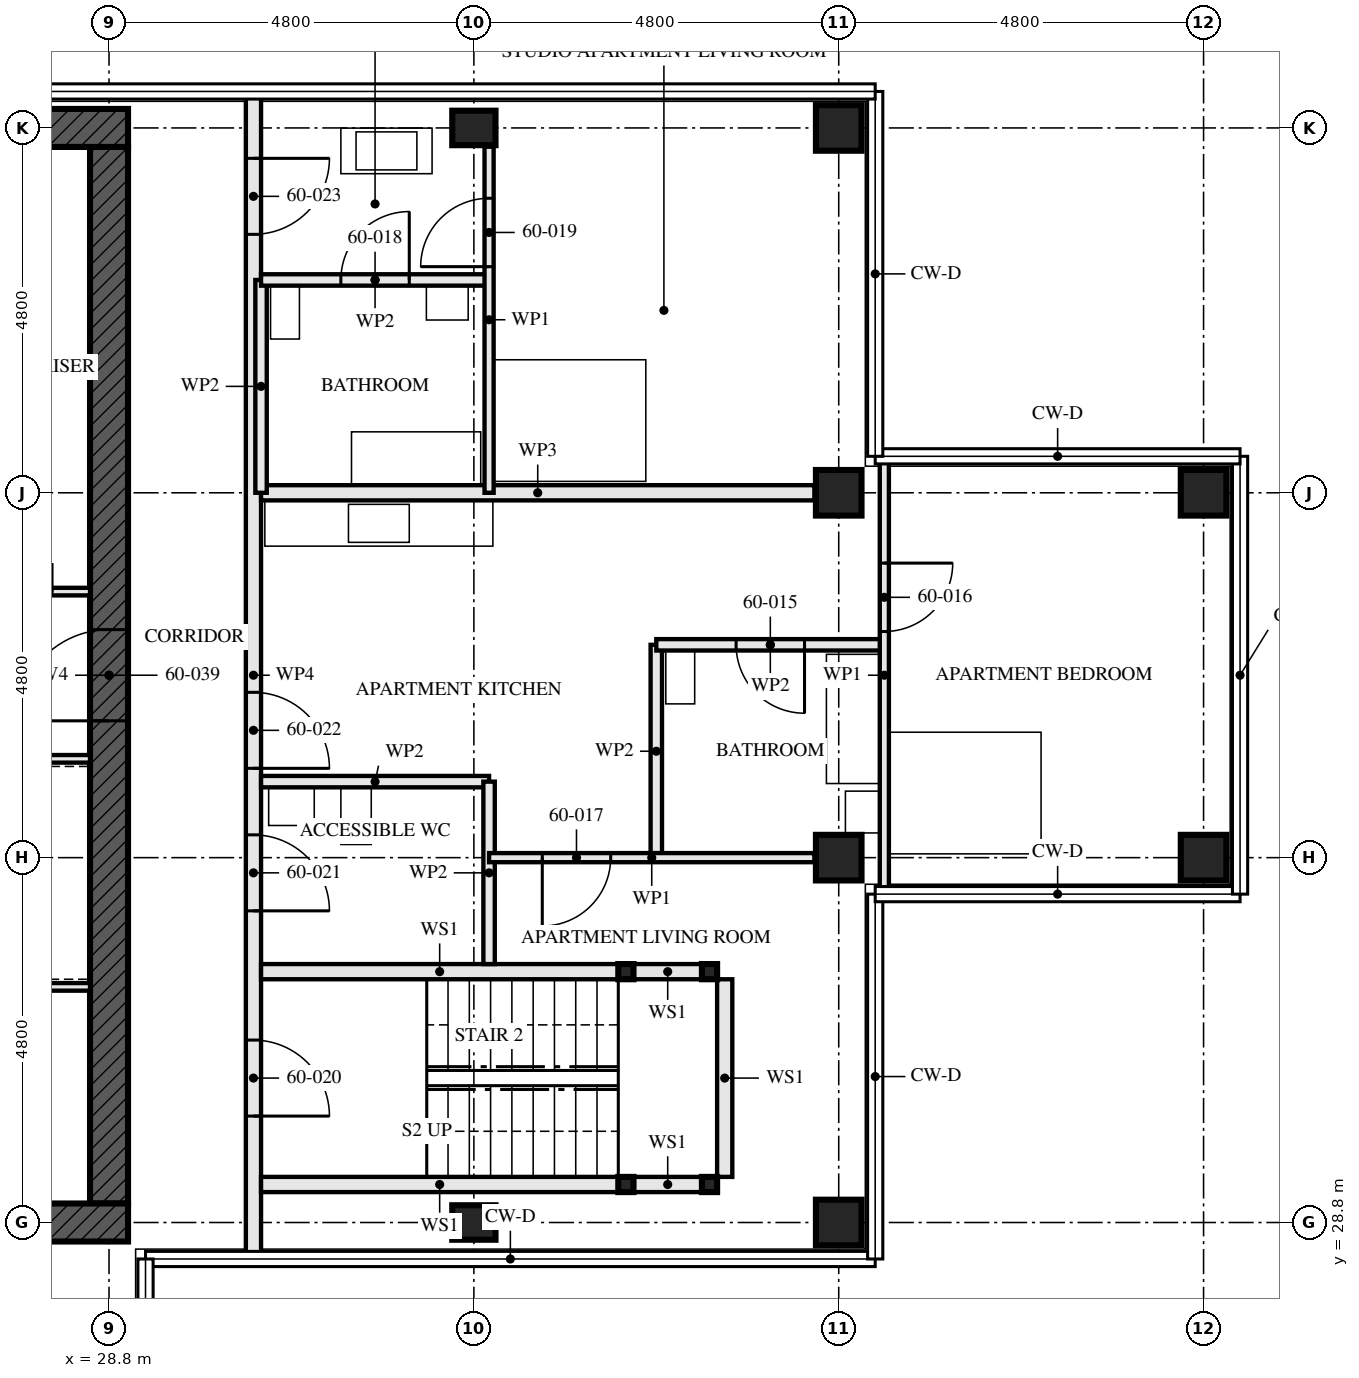
"""IFC4 building model, lengths in metres.
Left out: names, types, materials, properties, quantities, classifications, styles, units other than length and angle.
Written with IfcOpenShell. Run it as: python <this file> out.ifc"""

import sys

from ifc_helpers import new_model, si_unit, direction, frame, frame_2d, origin, origin_2d, place, context, subcontext, project, spatial, rectangle, hollow_rectangle, i_section, extrude, element, fill, save


model = new_model("IFC4")
c1 = context("Model", 3, precision=1e-05, world=origin(), true_north=direction((0.0, 1.0)))
c2 = subcontext(c1, "Body", "Model", "MODEL_VIEW")
j1 = project(units=[si_unit("LENGTHUNIT", "METRE"), si_unit("PLANEANGLEUNIT", "RADIAN")], contexts=[c1])
p1 = place(None, origin())
s1 = spatial("IfcSite", under=j1, at=p1, CompositionType="ELEMENT")
p2 = place(p1, origin())
s2 = spatial("IfcBuilding", under=s1, at=p2, CompositionType="ELEMENT")
p3 = place(p2, frame((0.0, 0.0, 219.0)))
s3 = spatial("IfcBuildingStorey", under=s2, at=p3, CompositionType="ELEMENT", Elevation=219.0)
for number, where, z_axis, x_axis in (
    (1, (33.6, 28.8, 0.0), (0.0, 0.0, 1.0), (0.0, 1.0, 0.0)),
    (2, (33.6, 43.2, 0.0), (0.0, 0.0, 1.0), (0.0, 1.0, 0.0)),
):
    element("IfcColumn", number, at=place(p3, frame(where, z_axis=z_axis, x_axis=x_axis)), inside=s3, PredefinedType="COLUMN", context=c2, shape_type="SweptSolid", body=[
        extrude(i_section(OverallWidth=0.454, OverallDepth=0.569, WebThickness=0.078, FlangeThickness=0.125, FilletRadius=0.015, at=origin_2d()), origin(), (0.0, 0.0, 1.0), 3.5),
    ])
for number, where, z_axis, x_axis in (
    (3, (38.4, 28.8, 0.0), (0.0, 0.0, 1.0), (0.0, 1.0, 0.0)),
    (4, (38.4, 33.6, 0.0), (0.0, 0.0, 1.0), (0.0, 1.0, 0.0)),
    (5, (38.4, 38.4, 0.0), (0.0, 0.0, 1.0), (0.0, 1.0, 0.0)),
    (6, (38.4, 43.2, 0.0), (0.0, 0.0, 1.0), (0.0, 1.0, 0.0)),
    (7, (43.2, 33.6, 0.0), (0.0, 0.0, 1.0), (0.0, 1.0, 0.0)),
    (8, (43.2, 38.4, 0.0), (0.0, 0.0, 1.0), (0.0, 1.0, 0.0)),
):
    element("IfcColumn", number, at=place(p3, frame(where, z_axis=z_axis, x_axis=x_axis)), inside=s3, PredefinedType="COLUMN", context=c2, shape_type="SweptSolid", body=[
        extrude(hollow_rectangle(XDim=0.6, YDim=0.6, WallThickness=0.05, at=origin_2d()), origin(), (0.0, 0.0, 1.0), 3.5),
    ])
p4 = place(p3, frame((14.15, 28.8, -0.17), z_axis=(0.0, 0.0, 1.0), x_axis=(1.0, 0.0, 0.0)))
e9 = element("IfcWall", 9, at=p4, inside=s3, PredefinedType="SHEAR", context=c2, shape_type="SweptSolid", body=[
    extrude(rectangle(XDim=14.9, YDim=0.5, at=frame_2d((7.45, 0.0))), origin(), (0.0, 0.0, 1.0), 3.5),
])
p5 = place(p4, frame((6.85, 0.0, 0.17)))
e10 = element("IfcOpeningElement", 10, at=p5, cuts=e9, PredefinedType="OPENING", context=c2, shape_type="SweptSolid", body=[
    extrude(rectangle(XDim=1.2, YDim=2.1, at=frame_2d((0.6, 1.05))), frame((0.0, 0.26, 0.0), z_axis=(0.0, -1.0, 0.0), x_axis=(1.0, 0.0, 0.0)), (0.0, 0.0, 1.0), 0.521),
])
p6 = place(p3, frame((29.05, 43.2, -0.17), z_axis=(0.0, 0.0, 1.0), x_axis=(-1.0, 0.0, 0.0)))
e11 = element("IfcWall", 11, at=p6, inside=s3, PredefinedType="SHEAR", context=c2, shape_type="SweptSolid", body=[
    extrude(rectangle(XDim=14.9, YDim=0.5, at=frame_2d((7.45, 0.0))), origin(), (0.0, 0.0, 1.0), 3.5),
])
p7 = place(p3, frame((28.8, 29.05, -0.17), z_axis=(0.0, 0.0, 1.0), x_axis=(0.0, 1.0, 0.0)))
e12 = element("IfcWall", 12, at=p7, inside=s3, PredefinedType="SHEAR", context=c2, shape_type="SweptSolid", body=[
    extrude(rectangle(XDim=13.9, YDim=0.5, at=frame_2d((6.95, 0.0))), origin(), (0.0, 0.0, 1.0), 3.5),
])
p8 = place(p7, frame((6.35, 0.0, 0.17)))
e13 = element("IfcOpeningElement", 13, at=p8, cuts=e12, PredefinedType="OPENING", context=c2, shape_type="SweptSolid", body=[
    extrude(rectangle(XDim=1.2, YDim=2.1, at=frame_2d((0.6, 1.05))), frame((0.0, 0.26, 0.0), z_axis=(0.0, -1.0, 0.0), x_axis=(1.0, 0.0, 0.0)), (0.0, 0.0, 1.0), 0.521),
])
for number, where, z_axis, x_axis in (
    (14, (36.7, 29.3, 0.0), (0.0, 0.0, 1.0), (1.0, 0.0, 0.0)),
    (15, (36.7, 32.1, 0.0), (0.0, 0.0, 1.0), (1.0, 0.0, 0.0)),
    (16, (35.6, 29.3, 0.0), (0.0, 0.0, 1.0), (1.0, 0.0, 0.0)),
    (17, (35.6, 32.1, 0.0), (0.0, 0.0, 1.0), (1.0, 0.0, 0.0)),
):
    element("IfcColumn", number, at=place(p3, frame(where, z_axis=z_axis, x_axis=x_axis)), inside=s3, PredefinedType="COLUMN", context=c2, shape_type="SweptSolid", body=[
        extrude(hollow_rectangle(XDim=0.2, YDim=0.2, WallThickness=0.008, at=origin_2d()), origin(), (0.0, 0.0, 1.0), 3.33),
    ])
p9 = place(p3, frame((36.6, 29.3, 0.0), z_axis=(0.0, 0.0, 1.0), x_axis=(-1.0, 0.0, 0.0)))
e18 = element("IfcWall", 18, at=p9, inside=s3, PredefinedType="SOLIDWALL", context=c2, shape_type="SweptSolid", body=[
    extrude(rectangle(XDim=0.9, YDim=0.2, at=frame_2d((0.45, 0.0))), origin(), (0.0, 0.0, 1.0), 2.99),
])
p10 = place(p3, frame((35.5, 29.3, 0.0), z_axis=(0.0, 0.0, 1.0), x_axis=(-1.0, 0.0, 0.0)))
e19 = element("IfcWall", 19, at=p10, inside=s3, PredefinedType="SOLIDWALL", context=c2, shape_type="SweptSolid", body=[
    extrude(rectangle(XDim=4.7, YDim=0.2, at=frame_2d((2.35, 0.0))), origin(), (0.0, 0.0, 1.0), 2.99),
])
p11 = place(p3, frame((36.6, 32.1, 0.0), z_axis=(0.0, 0.0, 1.0), x_axis=(-1.0, 0.0, 0.0)))
e20 = element("IfcWall", 20, at=p11, inside=s3, PredefinedType="SOLIDWALL", context=c2, shape_type="SweptSolid", body=[
    extrude(rectangle(XDim=0.9, YDim=0.2, at=frame_2d((0.45, 0.0))), origin(), (0.0, 0.0, 1.0), 2.99),
])
p12 = place(p3, frame((35.5, 32.1, 0.0), z_axis=(0.0, 0.0, 1.0), x_axis=(-1.0, 0.0, 0.0)))
e21 = element("IfcWall", 21, at=p12, inside=s3, PredefinedType="SOLIDWALL", context=c2, shape_type="SweptSolid", body=[
    extrude(rectangle(XDim=4.7, YDim=0.2, at=frame_2d((2.35, 0.0))), origin(), (0.0, 0.0, 1.0), 2.99),
])
p13 = place(p3, frame((36.9, 29.4, 0.0), z_axis=(0.0, 0.0, 1.0), x_axis=(0.0, 1.0, 0.0)))
e22 = element("IfcWall", 22, at=p13, inside=s3, PredefinedType="SOLIDWALL", context=c2, shape_type="SweptSolid", body=[
    extrude(rectangle(XDim=2.6, YDim=0.2, at=frame_2d((1.3, 0.0))), origin(), (0.0, 0.0, 1.0), 3.33),
])
p14 = place(p3, frame((33.8, 32.2, 0.0), z_axis=(0.0, 0.0, 1.0), x_axis=(0.0, 1.0, 0.0)))
e23 = element("IfcWall", 23, at=p14, inside=s3, PredefinedType="PARTITIONING", context=c2, shape_type="SweptSolid", body=[
    extrude(rectangle(XDim=2.4, YDim=0.15, at=frame_2d((1.2, 0.0))), origin(), (0.0, 0.0, 1.0), 2.55),
])
p15 = place(p3, frame((33.8, 34.6, 0.0), z_axis=(0.0, 0.0, 1.0), x_axis=(-1.0, 0.0, 0.0)))
e24 = element("IfcWall", 24, at=p15, inside=s3, PredefinedType="PARTITIONING", context=c2, shape_type="SweptSolid", body=[
    extrude(rectangle(XDim=3.0, YDim=0.15, at=frame_2d((1.5, 0.0))), origin(), (0.0, 0.0, 1.0), 3.33),
])
p16 = place(p3, frame((39.0, 36.4, 0.0), z_axis=(0.0, 0.0, 1.0), x_axis=(-1.0, 0.0, 0.0)))
e25 = element("IfcWall", 25, at=p16, inside=s3, PredefinedType="PARTITIONING", context=c2, shape_type="SweptSolid", body=[
    extrude(rectangle(XDim=3.0, YDim=0.15, at=frame_2d((1.5, 0.0))), origin(), (0.0, 0.0, 1.0), 3.33),
])
p17 = place(p16, frame((1.05, 0.0, 0.0)))
e26 = element("IfcOpeningElement", 26, at=p17, cuts=e25, PredefinedType="OPENING", context=c2, shape_type="SweptSolid", body=[
    extrude(rectangle(XDim=0.9, YDim=2.1, at=frame_2d((0.45, 1.05))), frame((0.0, 0.085, 0.0), z_axis=(0.0, -1.0, 0.0), x_axis=(1.0, 0.0, 0.0)), (0.0, 0.0, 1.0), 0.171),
])
p18 = place(p3, frame((36.0, 33.6, 0.0), z_axis=(0.0, 0.0, 1.0), x_axis=(0.0, 1.0, 0.0)))
e27 = element("IfcWall", 27, at=p18, inside=s3, PredefinedType="PARTITIONING", context=c2, shape_type="SweptSolid", body=[
    extrude(rectangle(XDim=2.8, YDim=0.15, at=frame_2d((1.4, 0.0))), origin(), (0.0, 0.0, 1.0), 3.33),
])
p19 = place(p3, frame((39.0, 33.145, 0.0), z_axis=(0.0, 0.0, 1.0), x_axis=(0.0, 1.0, 0.0)))
e28 = element("IfcWall", 28, at=p19, inside=s3, PredefinedType="PARTITIONING", context=c2, shape_type="SweptSolid", body=[
    extrude(rectangle(XDim=5.71, YDim=0.12, at=frame_2d((2.855, 0.0))), origin(), (0.0, 0.0, 1.0), 2.32),
])
p20 = place(p19, frame((3.43, 0.0, 0.0)))
e29 = element("IfcOpeningElement", 29, at=p20, cuts=e28, PredefinedType="OPENING", context=c2, shape_type="SweptSolid", body=[
    extrude(rectangle(XDim=0.9, YDim=2.1, at=frame_2d((0.45, 1.05))), frame((0.0, 0.071, 0.0), z_axis=(0.0, -1.0, 0.0), x_axis=(1.0, 0.0, 0.0)), (0.0, 0.0, 1.0), 0.141),
])
p21 = place(p3, frame((38.08, 33.6, 0.0), z_axis=(0.0, 0.0, 1.0), x_axis=(-1.0, 0.0, 0.0)))
e30 = element("IfcWall", 30, at=p21, inside=s3, PredefinedType="PARTITIONING", context=c2, shape_type="SweptSolid", body=[
    extrude(rectangle(XDim=4.28, YDim=0.12, at=frame_2d((2.14, 0.0))), origin(), (0.0, 0.0, 1.0), 2.55),
])
p22 = place(p21, frame((2.68, 0.0, 0.0)))
e31 = element("IfcOpeningElement", 31, at=p22, cuts=e30, PredefinedType="OPENING", context=c2, shape_type="SweptSolid", body=[
    extrude(rectangle(XDim=0.9, YDim=2.1, at=frame_2d((0.45, 1.05))), frame((0.0, 0.071, 0.0), z_axis=(0.0, -1.0, 0.0), x_axis=(1.0, 0.0, 0.0)), (0.0, 0.0, 1.0), 0.141),
])
p23 = place(p3, frame((38.08, 38.4, 0.0), z_axis=(0.0, 0.0, 1.0), x_axis=(-1.0, 0.0, 0.0)))
e32 = element("IfcWall", 32, at=p23, inside=s3, PredefinedType="PARTITIONING", context=c2, shape_type="SweptSolid", body=[
    extrude(rectangle(XDim=7.28, YDim=0.2, at=frame_2d((3.64, 0.0))), origin(), (0.0, 0.0, 1.0), 2.55),
])
p24 = place(p3, frame((33.8, 41.2, 0.0), z_axis=(0.0, 0.0, 1.0), x_axis=(-1.0, 0.0, 0.0)))
e33 = element("IfcWall", 33, at=p24, inside=s3, PredefinedType="PARTITIONING", context=c2, shape_type="SweptSolid", body=[
    extrude(rectangle(XDim=3.0, YDim=0.15, at=frame_2d((1.5, 0.0))), origin(), (0.0, 0.0, 1.0), 3.33),
])
p25 = place(p24, frame((1.05, 0.0, 0.0)))
e34 = element("IfcOpeningElement", 34, at=p25, cuts=e33, PredefinedType="OPENING", context=c2, shape_type="SweptSolid", body=[
    extrude(rectangle(XDim=0.9, YDim=2.1, at=frame_2d((0.45, 1.05))), frame((0.0, 0.085, 0.0), z_axis=(0.0, -1.0, 0.0), x_axis=(1.0, 0.0, 0.0)), (0.0, 0.0, 1.0), 0.171),
])
p26 = place(p3, frame((30.8, 38.4, 0.0), z_axis=(0.0, 0.0, 1.0), x_axis=(0.0, 1.0, 0.0)))
e35 = element("IfcWall", 35, at=p26, inside=s3, PredefinedType="PARTITIONING", context=c2, shape_type="SweptSolid", body=[
    extrude(rectangle(XDim=2.8, YDim=0.15, at=frame_2d((1.4, 0.0))), origin(), (0.0, 0.0, 1.0), 3.33),
])
p27 = place(p3, frame((33.8, 38.4, 0.0), z_axis=(0.0, 0.0, 1.0), x_axis=(0.0, 1.0, 0.0)))
e36 = element("IfcWall", 36, at=p27, inside=s3, PredefinedType="PARTITIONING", context=c2, shape_type="SweptSolid", body=[
    extrude(rectangle(XDim=4.553, YDim=0.12, at=frame_2d((2.276, 0.0))), origin(), (0.0, 0.0, 1.0), 3.33),
])
p28 = place(p27, frame((2.975, 0.0, 0.0)))
e37 = element("IfcOpeningElement", 37, at=p28, cuts=e36, PredefinedType="OPENING", context=c2, shape_type="SweptSolid", body=[
    extrude(rectangle(XDim=0.9, YDim=2.1, at=frame_2d((0.45, 1.05))), frame((0.0, 0.071, 0.0), z_axis=(0.0, -1.0, 0.0), x_axis=(1.0, 0.0, 0.0)), (0.0, 0.0, 1.0), 0.141),
])
p29 = place(p3, frame((30.7, 28.345, 0.0), z_axis=(0.0, 0.0, 1.0), x_axis=(0.0, 1.0, 0.0)))
e38 = element("IfcWall", 38, at=p29, inside=s3, PredefinedType="PARTITIONING", context=c2, shape_type="SweptSolid", body=[
    extrude(rectangle(XDim=15.31, YDim=0.2, at=frame_2d((7.655, 0.0))), origin(), (0.0, 0.0, 1.0), 2.32),
])
p30 = place(p29, frame((1.855, 0.0, 0.0)))
e39 = element("IfcOpeningElement", 39, at=p30, cuts=e38, PredefinedType="OPENING", context=c2, shape_type="SweptSolid", body=[
    extrude(rectangle(XDim=1.0, YDim=2.1, at=frame_2d((0.5, 1.05))), frame((0.0, 0.111, 0.0), z_axis=(0.0, -1.0, 0.0), x_axis=(1.0, 0.0, 0.0)), (0.0, 0.0, 1.0), 0.221),
])
p31 = place(p29, frame((4.555, 0.0, 0.0)))
e40 = element("IfcOpeningElement", 40, at=p31, cuts=e38, PredefinedType="OPENING", context=c2, shape_type="SweptSolid", body=[
    extrude(rectangle(XDim=1.0, YDim=2.1, at=frame_2d((0.5, 1.05))), frame((0.0, 0.111, 0.0), z_axis=(0.0, -1.0, 0.0), x_axis=(1.0, 0.0, 0.0)), (0.0, 0.0, 1.0), 0.221),
])
p32 = place(p29, frame((6.43, 0.0, 0.0)))
e41 = element("IfcOpeningElement", 41, at=p32, cuts=e38, PredefinedType="OPENING", context=c2, shape_type="SweptSolid", body=[
    extrude(rectangle(XDim=1.0, YDim=2.1, at=frame_2d((0.5, 1.05))), frame((0.0, 0.111, 0.0), z_axis=(0.0, -1.0, 0.0), x_axis=(1.0, 0.0, 0.0)), (0.0, 0.0, 1.0), 0.221),
])
p33 = place(p29, frame((13.455, 0.0, 0.0)))
e42 = element("IfcOpeningElement", 42, at=p33, cuts=e38, PredefinedType="OPENING", context=c2, shape_type="SweptSolid", body=[
    extrude(rectangle(XDim=1.0, YDim=2.1, at=frame_2d((0.5, 1.05))), frame((0.0, 0.111, 0.0), z_axis=(0.0, -1.0, 0.0), x_axis=(1.0, 0.0, 0.0)), (0.0, 0.0, 1.0), 0.221),
])
p34 = place(p3, frame((23.05, 34.9, 0.0), z_axis=(0.0, 0.0, 1.0), x_axis=(1.0, 0.0, 0.0)))
e43 = element("IfcWall", 43, at=p34, inside=s3, PredefinedType="SOLIDWALL", context=c2, shape_type="SweptSolid", body=[
    extrude(rectangle(XDim=5.5, YDim=0.1, at=frame_2d((2.75, 0.0))), origin(), (0.0, 0.0, 1.0), 3.33),
])
p35 = place(p34, frame((0.85, 0.0, 0.0)))
e44 = element("IfcOpeningElement", 44, at=p35, cuts=e43, PredefinedType="OPENING", context=c2, shape_type="SweptSolid", body=[
    extrude(rectangle(XDim=1.0, YDim=2.1, at=frame_2d((0.5, 1.05))), frame((0.0, 0.061, 0.0), z_axis=(0.0, -1.0, 0.0), x_axis=(1.0, 0.0, 0.0)), (0.0, 0.0, 1.0), 0.121),
])
p36 = place(p34, frame((3.625, 0.0, 0.0)))
e45 = element("IfcOpeningElement", 45, at=p36, cuts=e43, PredefinedType="OPENING", context=c2, shape_type="SweptSolid", body=[
    extrude(rectangle(XDim=1.0, YDim=2.1, at=frame_2d((0.5, 1.05))), frame((0.0, 0.061, 0.0), z_axis=(0.0, -1.0, 0.0), x_axis=(1.0, 0.0, 0.0)), (0.0, 0.0, 1.0), 0.121),
])
p37 = place(p3, frame((22.65, 37.1, 0.0), z_axis=(0.0, 0.0, 1.0), x_axis=(1.0, 0.0, 0.0)))
e46 = element("IfcWall", 46, at=p37, inside=s3, PredefinedType="SOLIDWALL", context=c2, shape_type="SweptSolid", body=[
    extrude(rectangle(XDim=5.9, YDim=0.1, at=frame_2d((2.95, 0.0))), origin(), (0.0, 0.0, 1.0), 3.33),
])
p38 = place(p37, frame((3.1, 0.0, 0.0)))
e47 = element("IfcOpeningElement", 47, at=p38, cuts=e46, PredefinedType="OPENING", context=c2, shape_type="SweptSolid", body=[
    extrude(rectangle(XDim=0.9, YDim=2.1, at=frame_2d((0.45, 1.05))), frame((0.0, 0.061, 0.0), z_axis=(0.0, -1.0, 0.0), x_axis=(1.0, 0.0, 0.0)), (0.0, 0.0, 1.0), 0.121),
])
p39 = place(p37, frame((4.7, 0.0, 0.0)))
e48 = element("IfcOpeningElement", 48, at=p39, cuts=e46, PredefinedType="OPENING", context=c2, shape_type="SweptSolid", body=[
    extrude(rectangle(XDim=0.7, YDim=2.1, at=frame_2d((0.35, 1.05))), frame((0.0, 0.061, 0.0), z_axis=(0.0, -1.0, 0.0), x_axis=(1.0, 0.0, 0.0)), (0.0, 0.0, 1.0), 0.121),
])
p40 = place(p3, frame((23.15, 31.9, 0.0), z_axis=(0.0, 0.0, 1.0), x_axis=(1.0, 0.0, 0.0)))
e49 = element("IfcWall", 49, at=p40, inside=s3, PredefinedType="SOLIDWALL", context=c2, shape_type="SweptSolid", body=[
    extrude(rectangle(XDim=5.4, YDim=0.1, at=frame_2d((2.7, 0.0))), origin(), (0.0, 0.0, 1.0), 3.33),
])
p41 = place(p17, origin())
e50 = element("IfcDoor", 50, at=p41, inside=s3, OperationType="SINGLE_SWING_RIGHT", PredefinedType="DOOR", context=c2, shape_type="SweptSolid", body=[
    extrude(rectangle(XDim=0.9, YDim=2.1, at=frame_2d((0.45, 1.05))), frame((0.0, 0.022, 0.0), z_axis=(0.0, -1.0, 0.0), x_axis=(1.0, 0.0, 0.0)), (0.0, 0.0, 1.0), 0.044),
])
fill(e26, e50)
p42 = place(p20, frame((0.9, 0.0, 0.0), z_axis=(0.0, 0.0, 1.0), x_axis=(-1.0, 0.0, 0.0)))
e51 = element("IfcDoor", 51, at=p42, inside=s3, OperationType="SINGLE_SWING_RIGHT", PredefinedType="DOOR", context=c2, shape_type="SweptSolid", body=[
    extrude(rectangle(XDim=0.9, YDim=2.1, at=frame_2d((0.45, 1.05))), frame((0.0, 0.022, 0.0), z_axis=(0.0, -1.0, 0.0), x_axis=(1.0, 0.0, 0.0)), (0.0, 0.0, 1.0), 0.044),
])
fill(e29, e51)
p43 = place(p22, origin())
e52 = element("IfcDoor", 52, at=p43, inside=s3, OperationType="SINGLE_SWING_LEFT", PredefinedType="DOOR", context=c2, shape_type="SweptSolid", body=[
    extrude(rectangle(XDim=0.9, YDim=2.1, at=frame_2d((0.45, 1.05))), frame((0.0, 0.022, 0.0), z_axis=(0.0, -1.0, 0.0), x_axis=(1.0, 0.0, 0.0)), (0.0, 0.0, 1.0), 0.044),
])
fill(e31, e52)
p44 = place(p25, frame((0.9, 0.0, 0.0), z_axis=(0.0, 0.0, 1.0), x_axis=(-1.0, 0.0, 0.0)))
e53 = element("IfcDoor", 53, at=p44, inside=s3, OperationType="SINGLE_SWING_LEFT", PredefinedType="DOOR", context=c2, shape_type="SweptSolid", body=[
    extrude(rectangle(XDim=0.9, YDim=2.1, at=frame_2d((0.45, 1.05))), frame((0.0, 0.022, 0.0), z_axis=(0.0, -1.0, 0.0), x_axis=(1.0, 0.0, 0.0)), (0.0, 0.0, 1.0), 0.044),
])
fill(e34, e53)
p45 = place(p28, origin())
e54 = element("IfcDoor", 54, at=p45, inside=s3, OperationType="SINGLE_SWING_RIGHT", PredefinedType="DOOR", context=c2, shape_type="SweptSolid", body=[
    extrude(rectangle(XDim=0.9, YDim=2.1, at=frame_2d((0.45, 1.05))), frame((0.0, 0.022, 0.0), z_axis=(0.0, -1.0, 0.0), x_axis=(1.0, 0.0, 0.0)), (0.0, 0.0, 1.0), 0.044),
])
fill(e37, e54)
p46 = place(p30, frame((1.0, 0.0, 0.0), z_axis=(0.0, 0.0, 1.0), x_axis=(-1.0, 0.0, 0.0)))
e55 = element("IfcDoor", 55, at=p46, inside=s3, OperationType="SINGLE_SWING_LEFT", PredefinedType="DOOR", context=c2, shape_type="SweptSolid", body=[
    extrude(rectangle(XDim=1.0, YDim=2.1, at=frame_2d((0.5, 1.05))), frame((0.0, 0.032, 0.0), z_axis=(0.0, -1.0, 0.0), x_axis=(1.0, 0.0, 0.0)), (0.0, 0.0, 1.0), 0.064),
])
fill(e39, e55)
p47 = place(p31, frame((1.0, 0.0, 0.0), z_axis=(0.0, 0.0, 1.0), x_axis=(-1.0, 0.0, 0.0)))
e56 = element("IfcDoor", 56, at=p47, inside=s3, OperationType="SINGLE_SWING_LEFT", PredefinedType="DOOR", context=c2, shape_type="SweptSolid", body=[
    extrude(rectangle(XDim=1.0, YDim=2.1, at=frame_2d((0.5, 1.05))), frame((0.0, 0.027, 0.0), z_axis=(0.0, -1.0, 0.0), x_axis=(1.0, 0.0, 0.0)), (0.0, 0.0, 1.0), 0.054),
])
fill(e40, e56)
p48 = place(p32, frame((1.0, 0.0, 0.0), z_axis=(0.0, 0.0, 1.0), x_axis=(-1.0, 0.0, 0.0)))
e57 = element("IfcDoor", 57, at=p48, inside=s3, OperationType="SINGLE_SWING_LEFT", PredefinedType="DOOR", context=c2, shape_type="SweptSolid", body=[
    extrude(rectangle(XDim=1.0, YDim=2.1, at=frame_2d((0.5, 1.05))), frame((0.0, 0.027, 0.0), z_axis=(0.0, -1.0, 0.0), x_axis=(1.0, 0.0, 0.0)), (0.0, 0.0, 1.0), 0.054),
])
fill(e41, e57)
p49 = place(p33, frame((1.0, 0.0, 0.0), z_axis=(0.0, 0.0, 1.0), x_axis=(-1.0, 0.0, 0.0)))
e58 = element("IfcDoor", 58, at=p49, inside=s3, OperationType="SINGLE_SWING_RIGHT", PredefinedType="DOOR", context=c2, shape_type="SweptSolid", body=[
    extrude(rectangle(XDim=1.0, YDim=2.1, at=frame_2d((0.5, 1.05))), frame((0.0, 0.027, 0.0), z_axis=(0.0, -1.0, 0.0), x_axis=(1.0, 0.0, 0.0)), (0.0, 0.0, 1.0), 0.054),
])
fill(e42, e58)
p50 = place(p8, origin())
e59 = element("IfcDoor", 59, at=p50, inside=s3, OperationType="SINGLE_SWING_LEFT", PredefinedType="DOOR", context=c2, shape_type="SweptSolid", body=[
    extrude(rectangle(XDim=1.2, YDim=2.1, at=frame_2d((0.6, 1.05))), frame((0.0, 0.027, 0.0), z_axis=(0.0, -1.0, 0.0), x_axis=(1.0, 0.0, 0.0)), (0.0, 0.0, 1.0), 0.054),
])
fill(e13, e59)
save(model, sys.argv[1])
